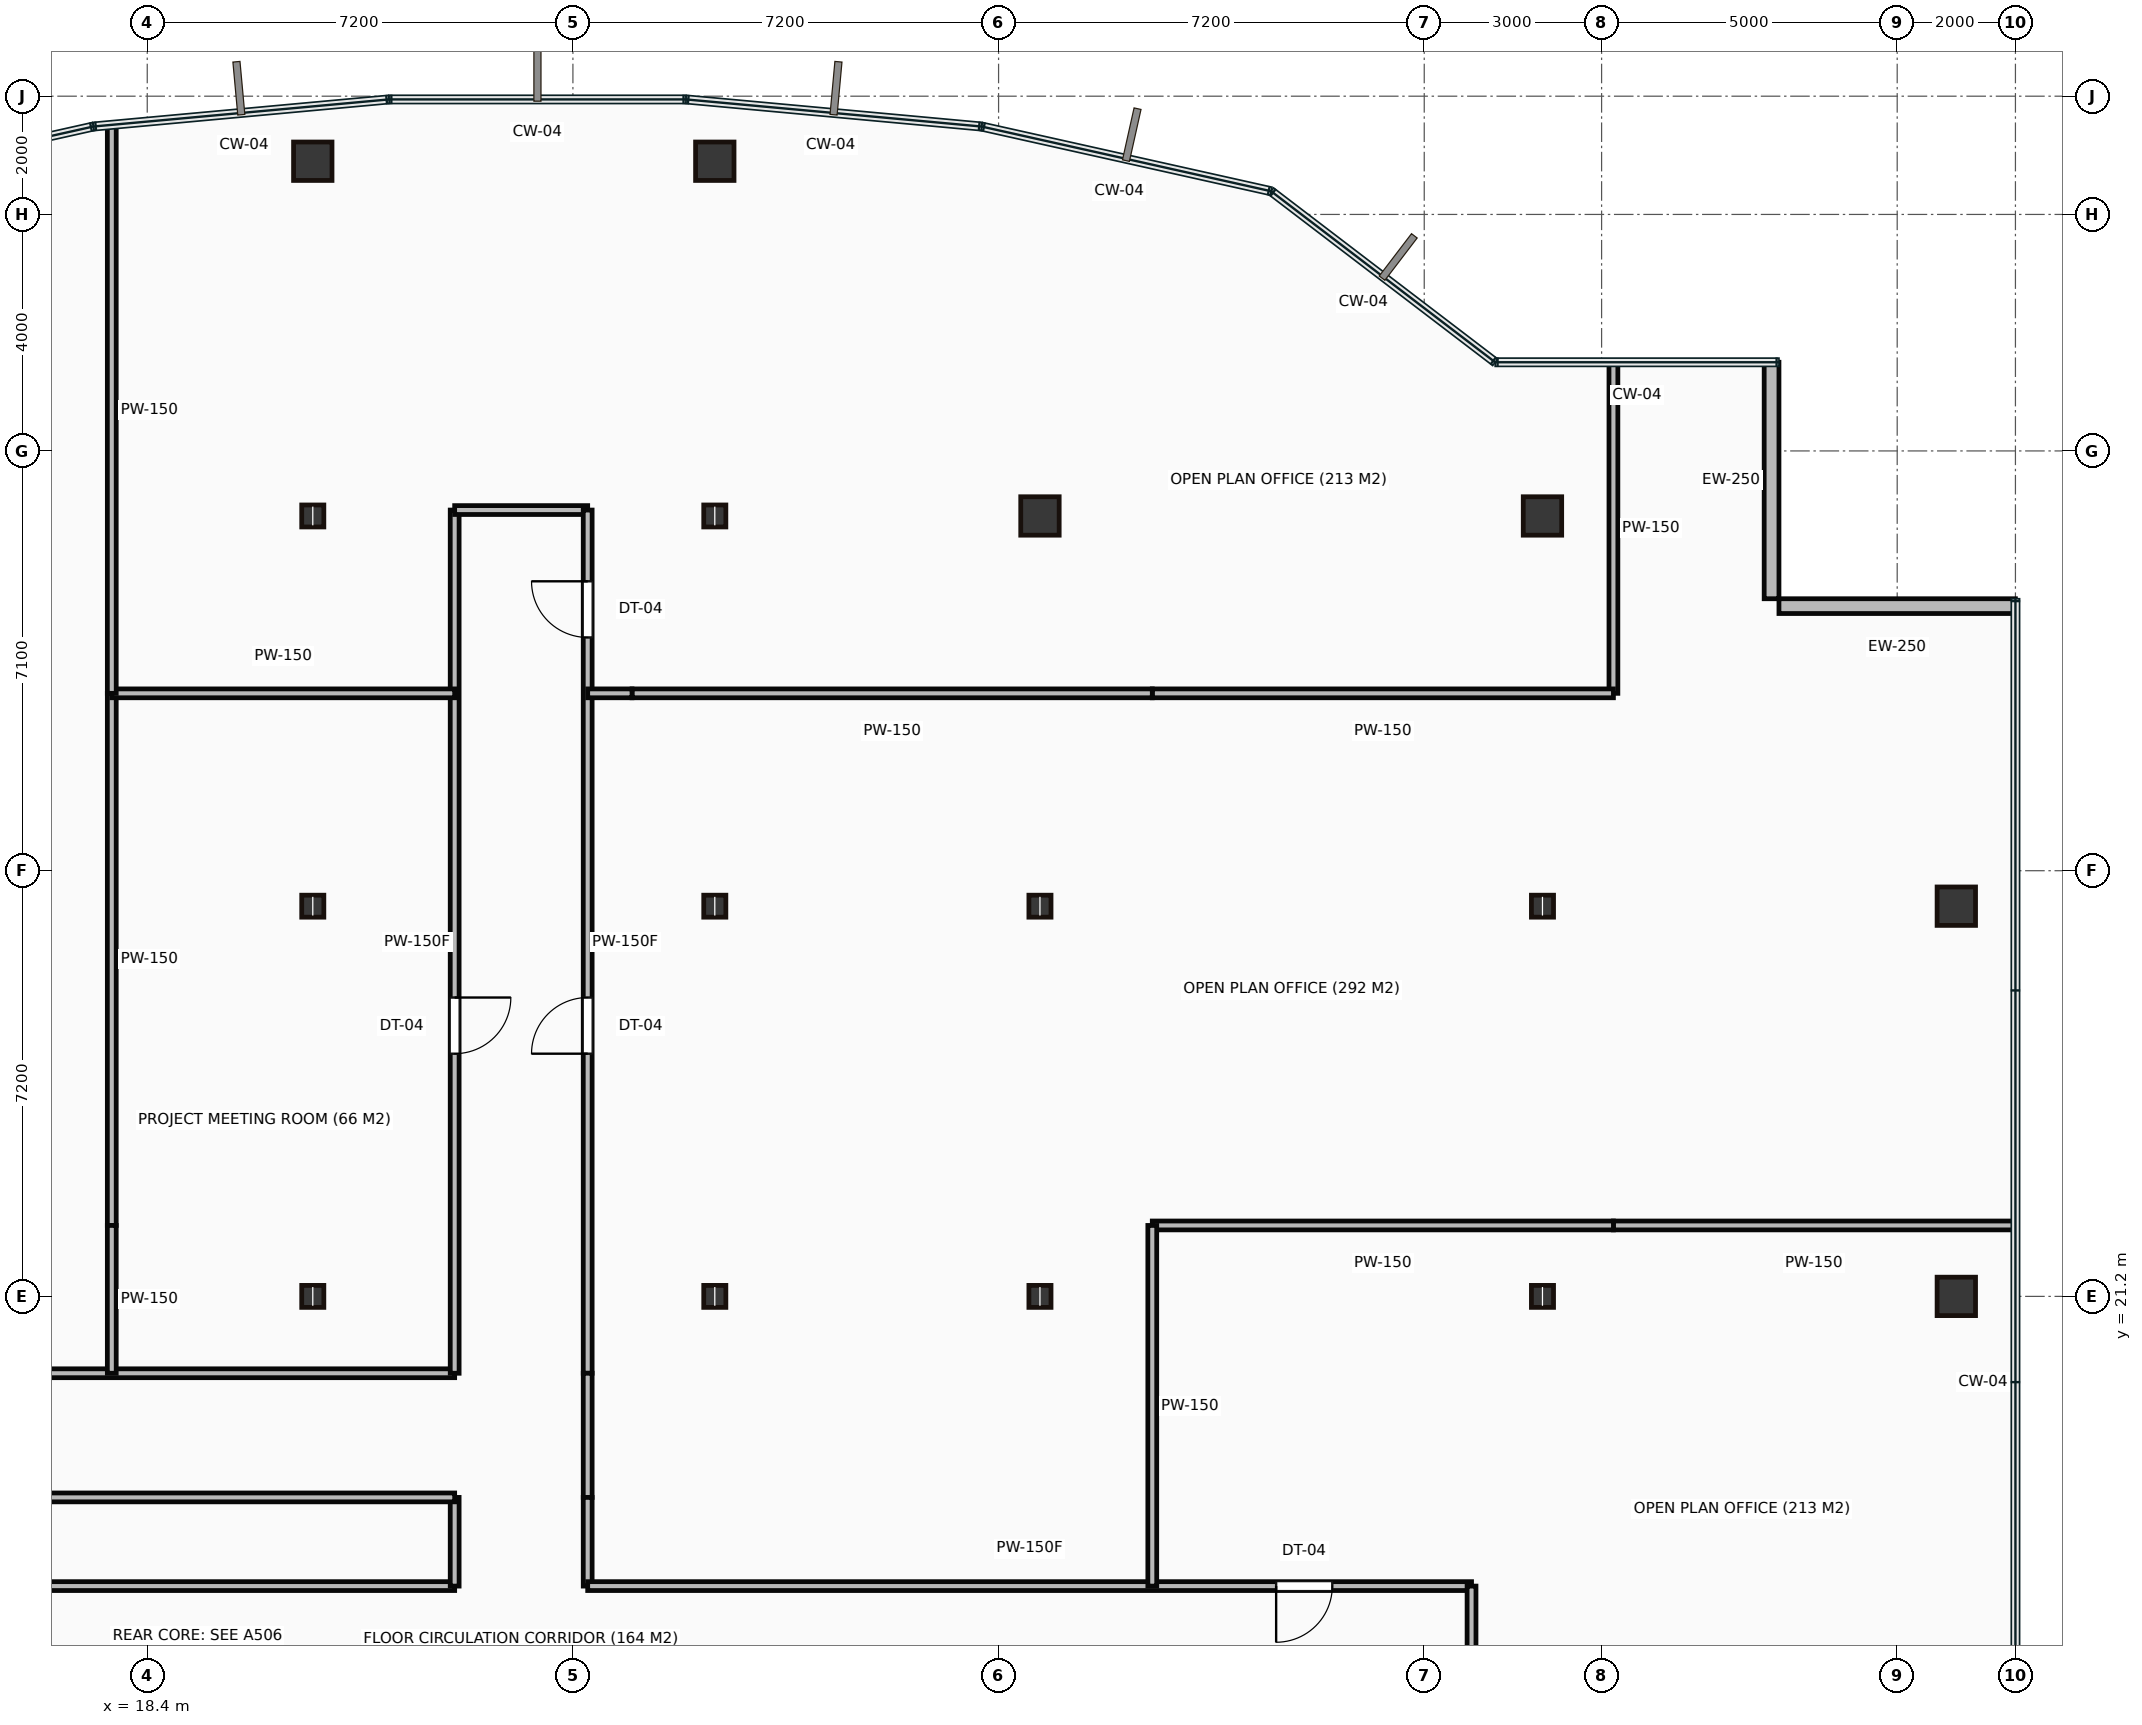
"""IFC4 building model, lengths in metres.
Left out: names, types, materials, properties, quantities, classifications, styles, units other than length and angle.
Written with IfcOpenShell. Run it as: python <this file> out.ifc"""

import sys

from ifc_helpers import new_model, si_unit, direction, frame, frame_2d, origin, origin_2d, place, context, subcontext, project, spatial, rectangle, hollow_rectangle, i_section, extrude, source, transform, mapped, element, fill, save


model = new_model("IFC4")
c1 = context("Model", 3, precision=1e-05, world=origin(), true_north=direction((0.0, 1.0)))
c2 = subcontext(c1, "Body", "Model", "MODEL_VIEW")
j1 = project(units=[si_unit("LENGTHUNIT", "METRE"), si_unit("PLANEANGLEUNIT", "RADIAN")], contexts=[c1])
p1 = place(None, origin())
s1 = spatial("IfcSite", under=j1, at=p1, CompositionType="ELEMENT")
p2 = place(p1, origin())
s2 = spatial("IfcBuilding", under=s1, at=p2, CompositionType="ELEMENT")
p3 = place(p2, frame((0.0, 0.0, 147.9)))
s3 = spatial("IfcBuildingStorey", under=s2, at=p3, CompositionType="ELEMENT", Elevation=147.9)
m1 = source(origin(), c2, "Body", "SweptSolid", [
    extrude(i_section(OverallWidth=0.374, OverallDepth=0.372, WebThickness=0.016, FlangeThickness=0.026, at=origin_2d()), origin(), (0.0, 0.0, 1.0), 3.65),
])
for number, where, z_axis, x_axis in (
    (1, (21.2, 21.2, 0.0), (0.0, 0.0, 1.0), (1.0, 0.0, 0.0)),
    (2, (21.2, 27.8, 0.0), (0.0, 0.0, 1.0), (1.0, 0.0, 0.0)),
    (3, (21.2, 34.4, 0.0), (0.0, 0.0, 1.0), (1.0, 0.0, 0.0)),
):
    element("IfcColumn", number, at=place(p3, frame(where, z_axis=z_axis, x_axis=x_axis)), inside=s3, PredefinedType="COLUMN", context=c2, shape_type="MappedRepresentation", body=[
        mapped(m1, transform((0.0, 0.0, 0.0))),
    ])
m2 = source(origin(), c2, "Body", "SweptSolid", [
    extrude(hollow_rectangle(XDim=0.65, YDim=0.65, WallThickness=0.032, at=origin_2d()), origin(), (0.0, 0.0, 1.0), 3.65),
])
p4 = place(p3, frame((21.2, 40.4, 0.0), z_axis=(0.0, 0.0, 1.0), x_axis=(1.0, 0.0, 0.0)))
e4 = element("IfcColumn", 4, at=p4, inside=s3, PredefinedType="COLUMN", context=c2, shape_type="MappedRepresentation", body=[
    mapped(m2, transform((0.0, 0.0, 0.0))),
])
for number, where, z_axis, x_axis in (
    (5, (28.0, 21.2, 0.0), (0.0, 0.0, 1.0), (1.0, 0.0, 0.0)),
    (6, (28.0, 27.8, 0.0), (0.0, 0.0, 1.0), (1.0, 0.0, 0.0)),
    (7, (28.0, 34.4, 0.0), (0.0, 0.0, 1.0), (1.0, 0.0, 0.0)),
):
    element("IfcColumn", number, at=place(p3, frame(where, z_axis=z_axis, x_axis=x_axis)), inside=s3, PredefinedType="COLUMN", context=c2, shape_type="MappedRepresentation", body=[
        mapped(m1, transform((0.0, 0.0, 0.0))),
    ])
p5 = place(p3, frame((28.0, 40.4, 0.0), z_axis=(0.0, 0.0, 1.0), x_axis=(1.0, 0.0, 0.0)))
e8 = element("IfcColumn", 8, at=p5, inside=s3, PredefinedType="COLUMN", context=c2, shape_type="MappedRepresentation", body=[
    mapped(m2, transform((0.0, 0.0, 0.0))),
])
for number, where, z_axis, x_axis in (
    (9, (33.5, 21.2, 0.0), (0.0, 0.0, 1.0), (1.0, 0.0, 0.0)),
    (10, (33.5, 27.8, 0.0), (0.0, 0.0, 1.0), (1.0, 0.0, 0.0)),
):
    element("IfcColumn", number, at=place(p3, frame(where, z_axis=z_axis, x_axis=x_axis)), inside=s3, PredefinedType="COLUMN", context=c2, shape_type="MappedRepresentation", body=[
        mapped(m1, transform((0.0, 0.0, 0.0))),
    ])
p6 = place(p3, frame((33.5, 34.4, 0.0), z_axis=(0.0, 0.0, 1.0), x_axis=(1.0, 0.0, 0.0)))
e11 = element("IfcColumn", 11, at=p6, inside=s3, PredefinedType="COLUMN", context=c2, shape_type="MappedRepresentation", body=[
    mapped(m2, transform((0.0, 0.0, 0.0))),
])
for number, where, z_axis, x_axis in (
    (12, (42.0, 21.2, 0.0), (0.0, 0.0, 1.0), (1.0, 0.0, 0.0)),
    (13, (42.0, 27.8, 0.0), (0.0, 0.0, 1.0), (1.0, 0.0, 0.0)),
):
    element("IfcColumn", number, at=place(p3, frame(where, z_axis=z_axis, x_axis=x_axis)), inside=s3, PredefinedType="COLUMN", context=c2, shape_type="MappedRepresentation", body=[
        mapped(m1, transform((0.0, 0.0, 0.0))),
    ])
for number, where, z_axis, x_axis in (
    (14, (42.0, 34.4, 0.0), (0.0, 0.0, 1.0), (1.0, 0.0, 0.0)),
    (15, (49.0, 21.2, 0.0), (0.0, 0.0, 1.0), (1.0, 0.0, 0.0)),
    (16, (49.0, 27.8, 0.0), (0.0, 0.0, 1.0), (1.0, 0.0, 0.0)),
):
    element("IfcColumn", number, at=place(p3, frame(where, z_axis=z_axis, x_axis=x_axis)), inside=s3, PredefinedType="COLUMN", context=c2, shape_type="MappedRepresentation", body=[
        mapped(m2, transform((0.0, 0.0, 0.0))),
    ])
m3 = source(origin(), c2, "Body", "SweptSolid", [
    extrude(rectangle(XDim=4.0, YDim=0.25, at=frame_2d((2.0, 0.0))), origin(), (0.0, 0.0, 1.0), 3.4),
])
for number, where, z_axis, x_axis in (
    (17, (50.0, 32.875, 0.0), (0.0, 0.0, 1.0), (-1.0, 0.0, 0.0)),
    (18, (45.875, 33.0, 0.0), (0.0, 0.0, 1.0), (0.0, 1.0, 0.0)),
):
    element("IfcWall", number, at=place(p3, frame(where, z_axis=z_axis, x_axis=x_axis)), inside=s3, PredefinedType="STANDARD", context=c2, shape_type="MappedRepresentation", body=[
        mapped(m3, transform((0.0, 0.0, 0.0))),
    ])
m4 = source(origin(), c2, "Body", "SweptSolid", [
    extrude(rectangle(XDim=19.0, YDim=0.15, at=frame_2d((9.5, 0.0))), origin(), (0.0, 0.0, 1.0), 3.4),
])
p7 = place(p3, frame((4.6, 16.3, 0.0), z_axis=(0.0, 0.0, 1.0), x_axis=(1.0, 0.0, 0.0)))
e19 = element("IfcWall", 19, at=p7, inside=s3, PredefinedType="PARTITIONING", context=c2, shape_type="MappedRepresentation", body=[
    mapped(m4, transform((0.0, 0.0, 0.0))),
])
p8 = place(p7, frame((9.025, 0.0, 0.0)))
e20 = element("IfcOpeningElement", 20, at=p8, cuts=e19, PredefinedType="OPENING", context=c2, shape_type="SweptSolid", body=[
    extrude(rectangle(XDim=0.95, YDim=2.15, at=frame_2d((0.475, 1.075))), frame((0.0, 0.085, 0.0), z_axis=(0.0, -1.0, 0.0), x_axis=(1.0, 0.0, 0.0)), (0.0, 0.0, 1.0), 0.17),
])
m5 = source(origin(), c2, "Body", "SweptSolid", [
    extrude(rectangle(XDim=1.5, YDim=0.15, at=frame_2d((0.75, 0.0))), origin(), (0.0, 0.0, 1.0), 3.4),
])
p9 = place(p3, frame((23.6, 16.3, 0.0), z_axis=(0.0, 0.0, 1.0), x_axis=(0.0, 1.0, 0.0)))
e21 = element("IfcWall", 21, at=p9, inside=s3, PredefinedType="PARTITIONING", context=c2, shape_type="MappedRepresentation", body=[
    mapped(m5, transform((0.0, 0.0, 0.0))),
])
for number, where, z_axis, x_axis in (
    (22, (23.6, 17.8, 0.0), (0.0, 0.0, 1.0), (-1.0, 0.0, 0.0)),
    (23, (4.6, 19.9, 0.0), (0.0, 0.0, 1.0), (1.0, 0.0, 0.0)),
):
    element("IfcWall", number, at=place(p3, frame(where, z_axis=z_axis, x_axis=x_axis)), inside=s3, PredefinedType="PARTITIONING", context=c2, shape_type="MappedRepresentation", body=[
        mapped(m4, transform((0.0, 0.0, 0.0))),
    ])
m6 = source(origin(), c2, "Body", "SweptSolid", [
    extrude(rectangle(XDim=14.6, YDim=0.15, at=frame_2d((7.3, 0.0))), origin(), (0.0, 0.0, 1.0), 3.4),
])
p10 = place(p3, frame((23.6, 19.9, 0.0), z_axis=(0.0, 0.0, 1.0), x_axis=(0.0, 1.0, 0.0)))
e24 = element("IfcWall", 24, at=p10, inside=s3, PredefinedType="PARTITIONING", context=c2, shape_type="MappedRepresentation", body=[
    mapped(m6, transform((0.0, 0.0, 0.0))),
])
p11 = place(p10, frame((5.405, 0.0, 0.0)))
e25 = element("IfcOpeningElement", 25, at=p11, cuts=e24, PredefinedType="OPENING", context=c2, shape_type="SweptSolid", body=[
    extrude(rectangle(XDim=0.95, YDim=2.15, at=frame_2d((0.475, 1.075))), frame((0.0, 0.085, 0.0), z_axis=(0.0, -1.0, 0.0), x_axis=(1.0, 0.0, 0.0)), (0.0, 0.0, 1.0), 0.17),
])
m7 = source(origin(), c2, "Body", "SweptSolid", [
    extrude(rectangle(XDim=2.25, YDim=0.15, at=frame_2d((1.125, 0.0))), origin(), (0.0, 0.0, 1.0), 2.76),
])
p12 = place(p3, frame((23.6, 34.5, 0.0), z_axis=(0.0, 0.0, 1.0), x_axis=(1.0, 0.0, 0.0)))
e26 = element("IfcWall", 26, at=p12, inside=s3, PredefinedType="PARTITIONING", context=c2, shape_type="MappedRepresentation", body=[
    mapped(m7, transform((0.0, 0.0, 0.0))),
])
p13 = place(p3, frame((25.85, 34.5, 0.0), z_axis=(0.0, 0.0, 1.0), x_axis=(0.0, -1.0, 0.0)))
e27 = element("IfcWall", 27, at=p13, inside=s3, PredefinedType="PARTITIONING", context=c2, shape_type="MappedRepresentation", body=[
    mapped(m6, transform((0.0, 0.0, 0.0))),
])
p14 = place(p13, frame((1.205, 0.0, 0.0)))
e28 = element("IfcOpeningElement", 28, at=p14, cuts=e27, PredefinedType="OPENING", context=c2, shape_type="SweptSolid", body=[
    extrude(rectangle(XDim=0.95, YDim=2.15, at=frame_2d((0.475, 1.075))), frame((0.0, 0.085, 0.0), z_axis=(0.0, -1.0, 0.0), x_axis=(1.0, 0.0, 0.0)), (0.0, 0.0, 1.0), 0.17),
])
p15 = place(p13, frame((8.245, 0.0, 0.0)))
e29 = element("IfcOpeningElement", 29, at=p15, cuts=e27, PredefinedType="OPENING", context=c2, shape_type="SweptSolid", body=[
    extrude(rectangle(XDim=0.95, YDim=2.15, at=frame_2d((0.475, 1.075))), frame((0.0, 0.085, 0.0), z_axis=(0.0, -1.0, 0.0), x_axis=(1.0, 0.0, 0.0)), (0.0, 0.0, 1.0), 0.17),
])
m8 = source(origin(), c2, "Body", "SweptSolid", [
    extrude(rectangle(XDim=2.1, YDim=0.15, at=frame_2d((1.05, 0.0))), origin(), (0.0, 0.0, 1.0), 3.4),
])
p16 = place(p3, frame((25.85, 19.9, 0.0), z_axis=(0.0, 0.0, 1.0), x_axis=(0.0, -1.0, 0.0)))
e30 = element("IfcWall", 30, at=p16, inside=s3, PredefinedType="PARTITIONING", context=c2, shape_type="MappedRepresentation", body=[
    mapped(m8, transform((0.0, 0.0, 0.0))),
])
p17 = place(p3, frame((25.85, 17.8, 0.0), z_axis=(0.0, 0.0, 1.0), x_axis=(0.0, -1.0, 0.0)))
e31 = element("IfcWall", 31, at=p17, inside=s3, PredefinedType="PARTITIONING", context=c2, shape_type="MappedRepresentation", body=[
    mapped(m5, transform((0.0, 0.0, 0.0))),
])
m9 = source(origin(), c2, "Body", "SweptSolid", [
    extrude(rectangle(XDim=14.95, YDim=0.15, at=frame_2d((7.475, 0.0))), origin(), (0.0, 0.0, 1.0), 3.4),
])
p18 = place(p3, frame((25.85, 16.3, 0.0), z_axis=(0.0, 0.0, 1.0), x_axis=(1.0, 0.0, 0.0)))
e32 = element("IfcWall", 32, at=p18, inside=s3, PredefinedType="PARTITIONING", context=c2, shape_type="MappedRepresentation", body=[
    mapped(m9, transform((0.0, 0.0, 0.0))),
])
p19 = place(p18, frame((11.645, 0.0, 0.0)))
e33 = element("IfcOpeningElement", 33, at=p19, cuts=e32, PredefinedType="OPENING", context=c2, shape_type="SweptSolid", body=[
    extrude(rectangle(XDim=0.95, YDim=2.15, at=frame_2d((0.475, 1.075))), frame((0.0, 0.085, 0.0), z_axis=(0.0, -1.0, 0.0), x_axis=(1.0, 0.0, 0.0)), (0.0, 0.0, 1.0), 0.17),
])
m10 = source(origin(), c2, "Body", "SweptSolid", [
    extrude(rectangle(XDim=2.3, YDim=0.15, at=frame_2d((1.15, 0.0))), origin(), (0.0, 0.0, 1.0), 3.4),
])
p20 = place(p3, frame((40.8, 16.3, 0.0), z_axis=(0.0, 0.0, 1.0), x_axis=(0.0, -1.0, 0.0)))
e34 = element("IfcWall", 34, at=p20, inside=s3, PredefinedType="PARTITIONING", context=c2, shape_type="MappedRepresentation", body=[
    mapped(m10, transform((0.0, 0.0, 0.0))),
])
m11 = source(origin(), c2, "Body", "SweptSolid", [
    extrude(rectangle(XDim=9.0, YDim=0.15, at=frame_2d((4.5, 0.0))), origin(), (0.0, 0.0, 1.0), 3.4),
])
p21 = place(p3, frame((17.8, 31.4, 0.0), z_axis=(0.0, 0.0, 1.0), x_axis=(0.0, -1.0, 0.0)))
e35 = element("IfcWall", 35, at=p21, inside=s3, PredefinedType="PARTITIONING", context=c2, shape_type="MappedRepresentation", body=[
    mapped(m11, transform((0.0, 0.0, 0.0))),
])
m12 = source(origin(), c2, "Body", "SweptSolid", [
    extrude(rectangle(XDim=2.5, YDim=0.15, at=frame_2d((1.25, 0.0))), origin(), (0.0, 0.0, 1.0), 3.4),
])
p22 = place(p3, frame((17.8, 22.4, 0.0), z_axis=(0.0, 0.0, 1.0), x_axis=(0.0, -1.0, 0.0)))
e36 = element("IfcWall", 36, at=p22, inside=s3, PredefinedType="PARTITIONING", context=c2, shape_type="MappedRepresentation", body=[
    mapped(m12, transform((0.0, 0.0, 0.0))),
])
m13 = source(origin(), c2, "Body", "SweptSolid", [
    extrude(rectangle(XDim=5.8, YDim=0.15, at=frame_2d((2.9, 0.0))), origin(), (0.0, 0.0, 1.0), 3.4),
])
p23 = place(p3, frame((17.8, 31.4, 0.0), z_axis=(0.0, 0.0, 1.0), x_axis=(1.0, 0.0, 0.0)))
e37 = element("IfcWall", 37, at=p23, inside=s3, PredefinedType="PARTITIONING", context=c2, shape_type="MappedRepresentation", body=[
    mapped(m13, transform((0.0, 0.0, 0.0))),
])
m14 = source(origin(), c2, "Body", "SweptSolid", [
    extrude(rectangle(XDim=9.596, YDim=0.15, at=frame_2d((4.798, 0.0))), origin(), (0.0, 0.0, 1.0), 3.4),
])
p24 = place(p3, frame((17.8, 40.996, 0.0), z_axis=(0.0, 0.0, 1.0), x_axis=(0.0, -1.0, 0.0)))
e38 = element("IfcWall", 38, at=p24, inside=s3, PredefinedType="PARTITIONING", context=c2, shape_type="MappedRepresentation", body=[
    mapped(m14, transform((0.0, 0.0, 0.0))),
])
m15 = source(origin(), c2, "Body", "SweptSolid", [
    extrude(rectangle(XDim=5.58, YDim=0.15, at=frame_2d((2.79, 0.0))), origin(), (0.0, 0.0, 1.0), 3.4),
])
p25 = place(p3, frame((43.2, 36.98, 0.0), z_axis=(0.0, 0.0, 1.0), x_axis=(0.0, -1.0, 0.0)))
e39 = element("IfcWall", 39, at=p25, inside=s3, PredefinedType="PARTITIONING", context=c2, shape_type="MappedRepresentation", body=[
    mapped(m15, transform((0.0, 0.0, 0.0))),
])
m16 = source(origin(), c2, "Body", "SweptSolid", [
    extrude(rectangle(XDim=7.8, YDim=0.15, at=frame_2d((3.9, 0.0))), origin(), (0.0, 0.0, 1.0), 3.4),
])
p26 = place(p3, frame((43.2, 31.4, 0.0), z_axis=(0.0, 0.0, 1.0), x_axis=(-1.0, 0.0, 0.0)))
e40 = element("IfcWall", 40, at=p26, inside=s3, PredefinedType="PARTITIONING", context=c2, shape_type="MappedRepresentation", body=[
    mapped(m16, transform((0.0, 0.0, 0.0))),
])
m17 = source(origin(), c2, "Body", "SweptSolid", [
    extrude(rectangle(XDim=8.8, YDim=0.15, at=frame_2d((4.4, 0.0))), origin(), (0.0, 0.0, 1.0), 3.4),
])
p27 = place(p3, frame((35.4, 31.4, 0.0), z_axis=(0.0, 0.0, 1.0), x_axis=(-1.0, 0.0, 0.0)))
e41 = element("IfcWall", 41, at=p27, inside=s3, PredefinedType="PARTITIONING", context=c2, shape_type="MappedRepresentation", body=[
    mapped(m17, transform((0.0, 0.0, 0.0))),
])
m18 = source(origin(), c2, "Body", "SweptSolid", [
    extrude(rectangle(XDim=0.75, YDim=0.15, at=frame_2d((0.375, 0.0))), origin(), (0.0, 0.0, 1.0), 3.4),
])
p28 = place(p3, frame((26.6, 31.4, 0.0), z_axis=(0.0, 0.0, 1.0), x_axis=(-1.0, 0.0, 0.0)))
e42 = element("IfcWall", 42, at=p28, inside=s3, PredefinedType="PARTITIONING", context=c2, shape_type="MappedRepresentation", body=[
    mapped(m18, transform((0.0, 0.0, 0.0))),
])
m19 = source(origin(), c2, "Body", "SweptSolid", [
    extrude(rectangle(XDim=6.78, YDim=0.15, at=frame_2d((3.39, 0.0))), origin(), (0.0, 0.0, 1.0), 3.4),
])
p29 = place(p3, frame((49.98, 22.4, 0.0), z_axis=(0.0, 0.0, 1.0), x_axis=(-1.0, 0.0, 0.0)))
e43 = element("IfcWall", 43, at=p29, inside=s3, PredefinedType="PARTITIONING", context=c2, shape_type="MappedRepresentation", body=[
    mapped(m19, transform((0.0, 0.0, 0.0))),
])
p30 = place(p3, frame((43.2, 22.4, 0.0), z_axis=(0.0, 0.0, 1.0), x_axis=(-1.0, 0.0, 0.0)))
e44 = element("IfcWall", 44, at=p30, inside=s3, PredefinedType="PARTITIONING", context=c2, shape_type="MappedRepresentation", body=[
    mapped(m16, transform((0.0, 0.0, 0.0))),
])
m20 = source(origin(), c2, "Body", "SweptSolid", [
    extrude(rectangle(XDim=6.1, YDim=0.15, at=frame_2d((3.05, 0.0))), origin(), (0.0, 0.0, 1.0), 3.4),
])
p31 = place(p3, frame((35.4, 22.4, 0.0), z_axis=(0.0, 0.0, 1.0), x_axis=(0.0, -1.0, 0.0)))
e45 = element("IfcWall", 45, at=p31, inside=s3, PredefinedType="PARTITIONING", context=c2, shape_type="MappedRepresentation", body=[
    mapped(m20, transform((0.0, 0.0, 0.0))),
])
m21 = source(origin(), c2, "Body", "SweptSolid", [
    extrude(rectangle(XDim=0.95, YDim=2.15, at=frame_2d((0.475, 1.075))), frame((0.0, 0.025, 0.0), z_axis=(0.0, -1.0, 0.0), x_axis=(1.0, 0.0, 0.0)), (0.0, 0.0, 1.0), 0.05),
])
p32 = place(p11, origin())
e46 = element("IfcDoor", 46, at=p32, inside=s3, OperationType="SINGLE_SWING_RIGHT", PredefinedType="DOOR", context=c2, shape_type="MappedRepresentation", body=[
    mapped(m21, transform((0.0, 0.0, 0.0))),
])
fill(e25, e46)
p33 = place(p14, origin())
e47 = element("IfcDoor", 47, at=p33, inside=s3, OperationType="SINGLE_SWING_LEFT", PredefinedType="DOOR", context=c2, shape_type="MappedRepresentation", body=[
    mapped(m21, transform((0.0, 0.0, 0.0))),
])
fill(e28, e47)
p34 = place(p15, origin())
e48 = element("IfcDoor", 48, at=p34, inside=s3, OperationType="SINGLE_SWING_RIGHT", PredefinedType="DOOR", context=c2, shape_type="MappedRepresentation", body=[
    mapped(m21, transform((0.0, 0.0, 0.0))),
])
fill(e29, e48)
p35 = place(p19, origin())
e49 = element("IfcDoor", 49, at=p35, inside=s3, OperationType="SINGLE_SWING_LEFT", PredefinedType="DOOR", context=c2, shape_type="MappedRepresentation", body=[
    mapped(m21, transform((0.0, 0.0, 0.0))),
])
fill(e33, e49)
save(model, sys.argv[1])
